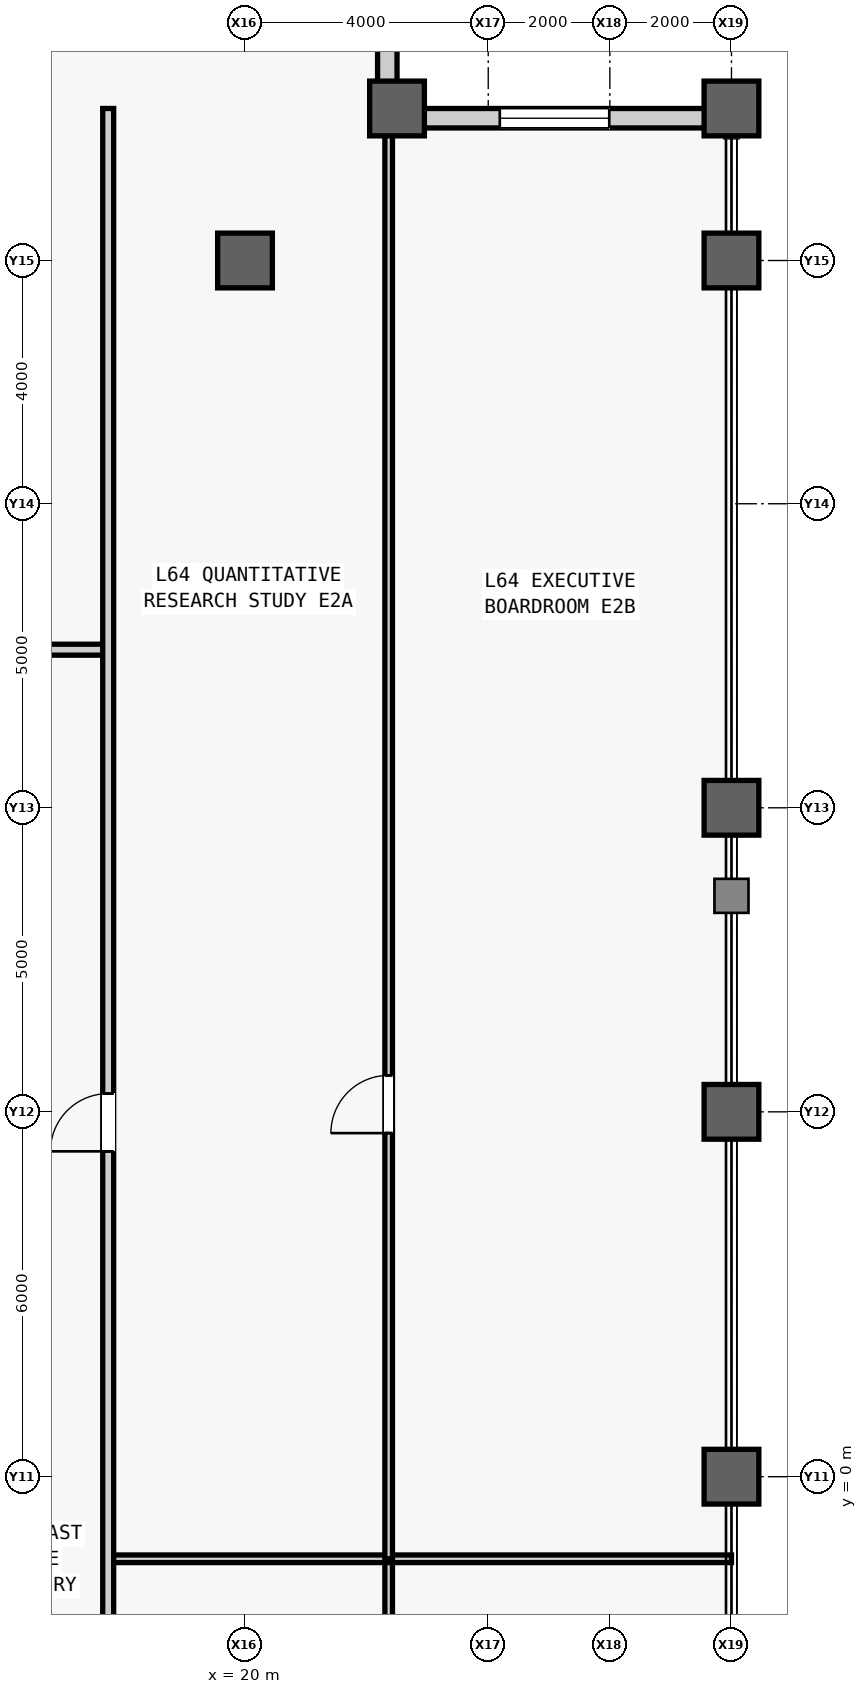
"""IFC4 building model, lengths in metres.
Left out: names, types, materials, properties, quantities, classifications, styles, units other than length and angle.
Written with IfcOpenShell. Run it as: python <this file> out.ifc"""

import sys

from ifc_helpers import new_model, si_unit, direction, frame, frame_2d, origin, origin_2d, place, context, subcontext, project, spatial, rectangle, hollow_rectangle, extrude, source, transform, mapped, element, fill, save


model = new_model("IFC4")
c1 = context("Model", 3, precision=1e-05, world=origin(), true_north=direction((0.0, 1.0)))
c2 = subcontext(c1, "Body", "Model", "MODEL_VIEW")
j1 = project(units=[si_unit("LENGTHUNIT", "METRE"), si_unit("PLANEANGLEUNIT", "RADIAN")], contexts=[c1])
p1 = place(None, origin())
s1 = spatial("IfcSite", under=j1, at=p1, CompositionType="ELEMENT")
p2 = place(p1, origin())
s2 = spatial("IfcBuilding", under=s1, at=p2, CompositionType="ELEMENT")
p3 = place(p2, frame((0.0, 0.0, 273.5)))
s3 = spatial("IfcBuildingStorey", under=s2, at=p3, CompositionType="ELEMENT", Elevation=273.5)
m1 = source(origin(), c2, "Body", "SweptSolid", [
    extrude(hollow_rectangle(XDim=0.9, YDim=0.9, WallThickness=0.05, at=origin_2d()), origin(), (0.0, 0.0, 1.0), 4.0),
])
for number, where, z_axis, x_axis in (
    (1, (20.0, 20.0, 0.0), (0.0, 0.0, 1.0), (1.0, 0.0, 0.0)),
    (2, (22.5, 22.5, 0.0), (0.0, 0.0, 1.0), (1.0, 0.0, 0.0)),
    (3, (28.0, 0.0, 0.0), (0.0, 0.0, 1.0), (1.0, 0.0, 0.0)),
    (4, (28.0, 6.0, 0.0), (0.0, 0.0, 1.0), (1.0, 0.0, 0.0)),
    (5, (28.0, 11.0, 0.0), (0.0, 0.0, 1.0), (1.0, 0.0, 0.0)),
    (6, (28.0, 20.0, 0.0), (0.0, 0.0, 1.0), (1.0, 0.0, 0.0)),
    (7, (28.0, 22.5, 0.0), (0.0, 0.0, 1.0), (1.0, 0.0, 0.0)),
):
    element("IfcColumn", number, at=place(p3, frame(where, z_axis=z_axis, x_axis=x_axis)), inside=s3, PredefinedType="COLUMN", context=c2, shape_type="MappedRepresentation", body=[
        mapped(m1, transform((0.0, 0.0, 0.0), scale=1.0)),
    ])
m2 = source(origin(), c2, "Body", "SweptSolid", [
    extrude(rectangle(XDim=5.18, YDim=0.32, at=frame_2d((2.59, 0.0))), origin(), (0.0, 0.0, 1.0), 3.231),
])
p4 = place(p3, frame((22.5, 22.34, 0.0), z_axis=(0.0, 0.0, 1.0), x_axis=(1.0, 0.0, 0.0)))
e8 = element("IfcWall", 8, at=p4, inside=s3, PredefinedType="STANDARD", context=c2, shape_type="MappedRepresentation", body=[
    mapped(m2, transform((0.0, 0.0, 0.0), scale=1.0)),
])
m3 = source(origin(), c2, "Body", "SweptSolid", [
    extrude(rectangle(XDim=1.8, YDim=2.4, at=frame_2d((0.9, 1.2))), frame((0.0, 0.17, 0.0), z_axis=(0.0, -1.0, 0.0), x_axis=(1.0, 0.0, 0.0)), (0.0, 0.0, 1.0), 0.34),
])
p5 = place(p4, frame((1.69, 0.0, 0.5)))
e9 = element("IfcOpeningElement", 9, at=p5, cuts=e8, PredefinedType="OPENING", context=c2, shape_type="MappedRepresentation", body=[
    mapped(m3, transform((0.0, 0.0, 0.0), scale=1.0)),
])
p6 = place(p3, frame((22.34, 22.5, 0.0), z_axis=(0.0, 0.0, 1.0), x_axis=(0.0, 1.0, 0.0)))
e10 = element("IfcWall", 10, at=p6, inside=s3, PredefinedType="STANDARD", context=c2, shape_type="MappedRepresentation", body=[
    mapped(m2, transform((0.0, 0.0, 0.0), scale=1.0)),
])
p7 = place(p6, frame((1.69, 0.0, 0.5)))
e11 = element("IfcOpeningElement", 11, at=p7, cuts=e10, PredefinedType="OPENING", context=c2, shape_type="MappedRepresentation", body=[
    mapped(m3, transform((0.0, 0.0, 0.0), scale=1.0)),
])
m4 = source(origin(), c2, "Body", "SweptSolid", [
    extrude(rectangle(XDim=2.4, YDim=0.18, at=frame_2d((1.2, 0.0))), origin(), (0.0, 0.0, 1.0), 3.78),
])
p8 = place(p3, frame((15.35, 13.6, 0.0), z_axis=(0.0, 0.0, 1.0), x_axis=(1.0, 0.0, 0.0)))
e12 = element("IfcWall", 12, at=p8, inside=s3, PredefinedType="PARTITIONING", context=c2, shape_type="MappedRepresentation", body=[
    mapped(m4, transform((0.0, 0.0, 0.0), scale=1.0)),
])
m5 = source(origin(), c2, "Body", "SweptSolid", [
    extrude(rectangle(XDim=17.35, YDim=0.125, at=frame_2d((8.675, 0.0))), origin(), (0.0, 0.0, 1.0), 3.164),
])
p9 = place(p3, frame((22.363, -18.7, 0.0), z_axis=(0.0, 0.0, 1.0), x_axis=(0.0, 1.0, 0.0)))
e13 = element("IfcWall", 13, at=p9, inside=s3, PredefinedType="PARTITIONING", context=c2, shape_type="MappedRepresentation", body=[
    mapped(m5, transform((0.0, 0.0, 0.0), scale=1.0)),
])
m6 = source(origin(), c2, "Body", "SweptSolid", [
    extrude(rectangle(XDim=0.95, YDim=2.15, at=frame_2d((0.475, 1.075))), frame((0.0, 0.073, 0.0), z_axis=(0.0, -1.0, 0.0), x_axis=(1.0, 0.0, 0.0)), (0.0, 0.0, 1.0), 0.145),
])
p10 = place(p9, frame((9.4, 0.0, 0.0)))
e14 = element("IfcOpeningElement", 14, at=p10, cuts=e13, PredefinedType="OPENING", context=c2, shape_type="MappedRepresentation", body=[
    mapped(m6, transform((0.0, 0.0, 0.0), scale=1.0)),
])
m7 = source(origin(), c2, "Body", "SweptSolid", [
    extrude(rectangle(XDim=10.25, YDim=0.125, at=frame_2d((5.125, 0.0))), origin(), (0.0, 0.0, 1.0), 3.78),
])
p11 = place(p3, frame((17.75, -1.35, 0.0), z_axis=(0.0, 0.0, 1.0), x_axis=(1.0, 0.0, 0.0)))
e15 = element("IfcWall", 15, at=p11, inside=s3, PredefinedType="PARTITIONING", context=c2, shape_type="MappedRepresentation", body=[
    mapped(m7, transform((0.0, 0.0, 0.0), scale=1.0)),
])
m8 = source(origin(), c2, "Body", "SweptSolid", [
    extrude(rectangle(XDim=23.85, YDim=0.125, at=frame_2d((11.925, 0.0))), origin(), (0.0, 0.0, 1.0), 3.164),
])
p12 = place(p3, frame((22.363, -1.35, 0.0), z_axis=(0.0, 0.0, 1.0), x_axis=(0.0, 1.0, 0.0)))
e16 = element("IfcWall", 16, at=p12, inside=s3, PredefinedType="PARTITIONING", context=c2, shape_type="MappedRepresentation", body=[
    mapped(m8, transform((0.0, 0.0, 0.0), scale=1.0)),
])
p13 = place(p12, frame((7.0, 0.0, 0.0)))
e17 = element("IfcOpeningElement", 17, at=p13, cuts=e16, PredefinedType="OPENING", context=c2, shape_type="MappedRepresentation", body=[
    mapped(m6, transform((0.0, 0.0, 0.0), scale=1.0)),
])
m9 = source(origin(), c2, "Body", "SweptSolid", [
    extrude(rectangle(XDim=41.2, YDim=0.18, at=frame_2d((20.6, 0.0))), origin(), (0.0, 0.0, 1.0), 3.78),
])
p14 = place(p3, frame((17.75, -18.7, 0.0), z_axis=(0.0, 0.0, 1.0), x_axis=(0.0, 1.0, 0.0)))
e18 = element("IfcWall", 18, at=p14, inside=s3, PredefinedType="PARTITIONING", context=c2, shape_type="MappedRepresentation", body=[
    mapped(m9, transform((0.0, 0.0, 0.0), scale=1.0)),
])
m10 = source(origin(), c2, "Body", "SweptSolid", [
    extrude(rectangle(XDim=0.95, YDim=2.15, at=frame_2d((0.475, 1.075))), frame((0.0, 0.1, 0.0), z_axis=(0.0, -1.0, 0.0), x_axis=(1.0, 0.0, 0.0)), (0.0, 0.0, 1.0), 0.2),
])
p15 = place(p14, frame((9.7, 0.0, 0.0)))
e19 = element("IfcOpeningElement", 19, at=p15, cuts=e18, PredefinedType="OPENING", context=c2, shape_type="MappedRepresentation", body=[
    mapped(m10, transform((0.0, 0.0, 0.0), scale=1.0)),
])
p16 = place(p14, frame((24.05, 0.0, 0.0)))
e20 = element("IfcOpeningElement", 20, at=p16, cuts=e18, PredefinedType="OPENING", context=c2, shape_type="MappedRepresentation", body=[
    mapped(m10, transform((0.0, 0.0, 0.0), scale=1.0)),
])
m11 = source(origin(), c2, "Body", "SweptSolid", [
    extrude(rectangle(XDim=1.8, YDim=2.4, at=frame_2d((0.9, 1.2))), frame((0.0, 0.03, 0.0), z_axis=(0.0, -1.0, 0.0), x_axis=(1.0, 0.0, 0.0)), (0.0, 0.0, 1.0), 0.06),
])
p17 = place(p5, origin())
e21 = element("IfcWindow", 21, at=p17, inside=s3, PartitioningType="SINGLE_PANEL", PredefinedType="WINDOW", context=c2, shape_type="MappedRepresentation", body=[
    mapped(m11, transform((0.0, 0.0, 0.0), scale=1.0)),
])
fill(e9, e21)
m12 = source(origin(), c2, "Body", "SweptSolid", [
    extrude(rectangle(XDim=0.95, YDim=2.15, at=frame_2d((0.475, 1.075))), frame((0.0, 0.025, 0.0), z_axis=(0.0, -1.0, 0.0), x_axis=(1.0, 0.0, 0.0)), (0.0, 0.0, 1.0), 0.05),
])
p18 = place(p13, origin())
e22 = element("IfcDoor", 22, at=p18, inside=s3, OperationType="SINGLE_SWING_LEFT", PredefinedType="DOOR", context=c2, shape_type="MappedRepresentation", body=[
    mapped(m12, transform((0.0, 0.0, 0.0), scale=1.0)),
])
fill(e17, e22)
p19 = place(p16, origin())
e23 = element("IfcDoor", 23, at=p19, inside=s3, OperationType="SINGLE_SWING_LEFT", PredefinedType="DOOR", context=c2, shape_type="MappedRepresentation", body=[
    mapped(m12, transform((0.0, 0.0, 0.0), scale=1.0)),
])
fill(e20, e23)
save(model, sys.argv[1])
